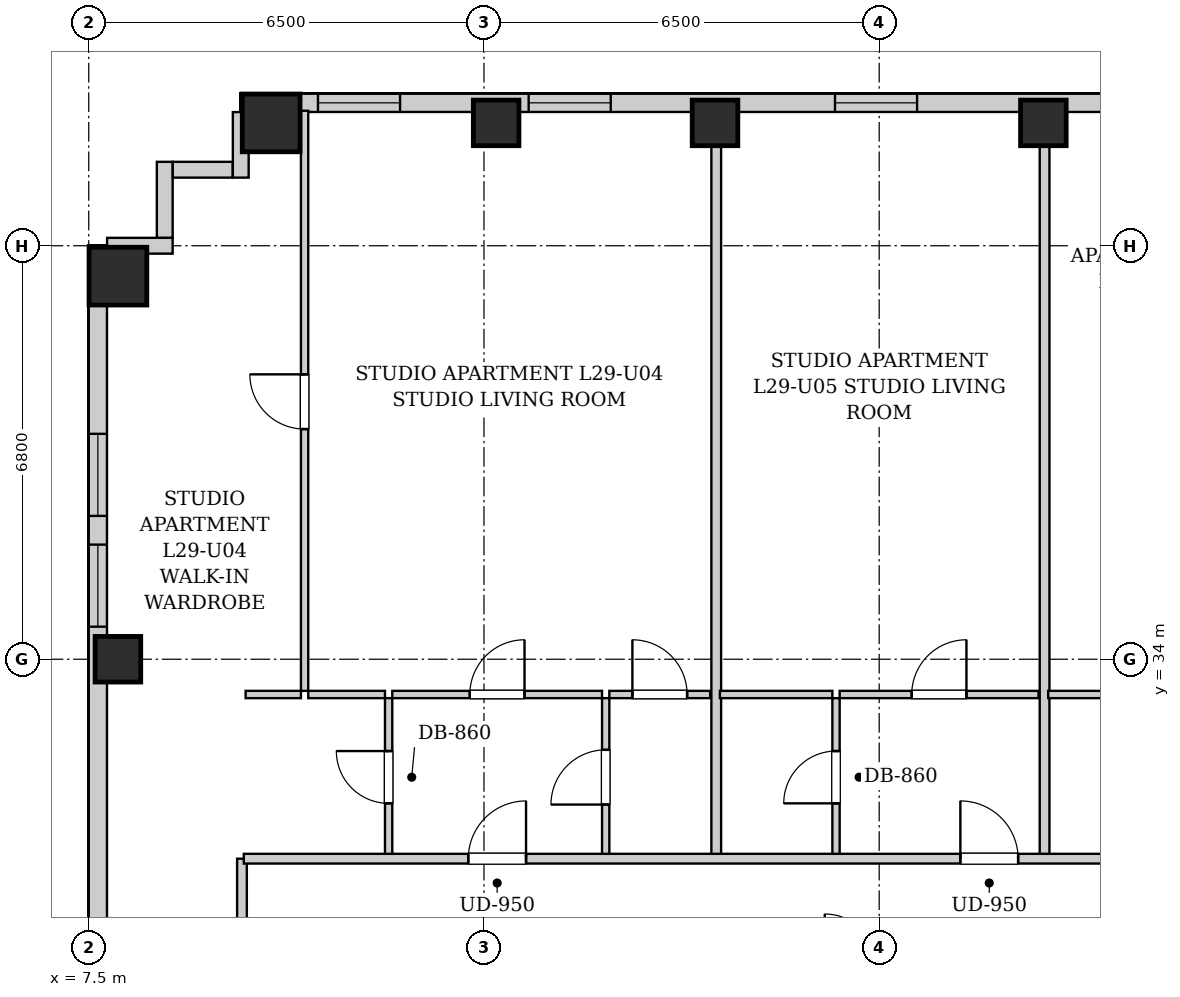
"""IFC4 building model, lengths in metres.
Left out: names, types, materials, properties, quantities, classifications, styles, units other than length and angle.
Written with IfcOpenShell. Run it as: python <this file> out.ifc"""

import sys

from ifc_helpers import new_model, si_unit, direction, frame, frame_2d, origin, origin_2d, place, context, subcontext, project, spatial, rectangle, extrude, element, fill, save


model = new_model("IFC4")
c1 = context("Model", 3, precision=1e-05, world=origin(), true_north=direction((0.0, 1.0)))
c2 = subcontext(c1, "Body", "Model", "MODEL_VIEW")
j1 = project(units=[si_unit("LENGTHUNIT", "METRE"), si_unit("PLANEANGLEUNIT", "RADIAN")], contexts=[c1])
p1 = place(None, origin())
s1 = spatial("IfcSite", under=j1, at=p1, CompositionType="ELEMENT")
p2 = place(p1, origin())
s2 = spatial("IfcBuilding", under=s1, at=p2, CompositionType="ELEMENT")
p3 = place(p2, frame((0.0, 0.0, 103.9)))
s3 = spatial("IfcBuildingStorey", under=s2, at=p3, CompositionType="ELEMENT", Elevation=103.9)
p4 = place(p3, frame((10.5, 42.82, 0.0), z_axis=(0.0, 0.0, 1.0), x_axis=(1.0, 0.0, 0.0)))
e1 = element("IfcColumn", 1, at=p4, inside=s3, PredefinedType="COLUMN", context=c2, shape_type="SweptSolid", body=[
    extrude(rectangle(XDim=0.95, YDim=0.95, at=origin_2d()), origin(), (0.0, 0.0, 1.0), 3.2),
])
for number, where, z_axis, x_axis in (
    (2, (14.2, 42.82, 0.0), (0.0, 0.0, 1.0), (1.0, 0.0, 0.0)),
    (3, (17.8, 42.82, 0.0), (0.0, 0.0, 1.0), (1.0, 0.0, 0.0)),
    (4, (23.2, 42.82, 0.0), (0.0, 0.0, 1.0), (1.0, 0.0, 0.0)),
    (5, (7.98, 34.0, 0.0), (0.0, 0.0, 1.0), (1.0, 0.0, 0.0)),
):
    element("IfcColumn", number, at=place(p3, frame(where, z_axis=z_axis, x_axis=x_axis)), inside=s3, PredefinedType="COLUMN", context=c2, shape_type="SweptSolid", body=[
        extrude(rectangle(XDim=0.75, YDim=0.75, at=origin_2d()), origin(), (0.0, 0.0, 1.0), 3.2),
    ])
p5 = place(p3, frame((7.98, 40.3, 0.0), z_axis=(0.0, 0.0, 1.0), x_axis=(1.0, 0.0, 0.0)))
e6 = element("IfcColumn", 6, at=p5, inside=s3, PredefinedType="COLUMN", context=c2, shape_type="SweptSolid", body=[
    extrude(rectangle(XDim=0.95, YDim=0.95, at=origin_2d()), origin(), (0.0, 0.0, 1.0), 3.2),
])
p6 = place(p3, frame((10.0, 43.15, 0.0), z_axis=(0.0, 0.0, 1.0), x_axis=(1.0, 0.0, 0.0)))
e7 = element("IfcWall", 7, at=p6, inside=s3, PredefinedType="SOLIDWALL", context=c2, shape_type="SweptSolid", body=[
    extrude(rectangle(XDim=23.15, YDim=0.3, at=frame_2d((11.575, 0.0))), origin(), (0.0, 0.0, 1.0), 2.94),
])
p7 = place(p6, frame((4.735, 0.0, 0.55)))
e8 = element("IfcOpeningElement", 8, at=p7, cuts=e7, PredefinedType="OPENING", context=c2, shape_type="SweptSolid", body=[
    extrude(rectangle(XDim=1.35, YDim=1.2, at=frame_2d((0.675, 0.6))), frame((0.0, 0.16, 0.0), z_axis=(0.0, -1.0, 0.0), x_axis=(1.0, 0.0, 0.0)), (0.0, 0.0, 1.0), 0.32),
])
p8 = place(p6, frame((1.27, 0.0, 0.55)))
e9 = element("IfcOpeningElement", 9, at=p8, cuts=e7, PredefinedType="OPENING", context=c2, shape_type="SweptSolid", body=[
    extrude(rectangle(XDim=1.35, YDim=1.2, at=frame_2d((0.675, 0.6))), frame((0.0, 0.16, 0.0), z_axis=(0.0, -1.0, 0.0), x_axis=(1.0, 0.0, 0.0)), (0.0, 0.0, 1.0), 0.32),
])
p9 = place(p6, frame((9.773, 0.0, 0.55)))
e10 = element("IfcOpeningElement", 10, at=p9, cuts=e7, PredefinedType="OPENING", context=c2, shape_type="SweptSolid", body=[
    extrude(rectangle(XDim=1.35, YDim=1.2, at=frame_2d((0.675, 0.6))), frame((0.0, 0.16, 0.0), z_axis=(0.0, -1.0, 0.0), x_axis=(1.0, 0.0, 0.0)), (0.0, 0.0, 1.0), 0.32),
])
p10 = place(p6, frame((17.5, 0.0, 0.55)))
e11 = element("IfcOpeningElement", 11, at=p10, cuts=e7, PredefinedType="OPENING", context=c2, shape_type="SweptSolid", body=[
    extrude(rectangle(XDim=0.85, YDim=1.2, at=frame_2d((0.425, 0.6))), frame((0.0, 0.16, 0.0), z_axis=(0.0, -1.0, 0.0), x_axis=(1.0, 0.0, 0.0)), (0.0, 0.0, 1.0), 0.32),
])
p11 = place(p6, frame((19.393, 0.0, 0.55)))
e12 = element("IfcOpeningElement", 12, at=p11, cuts=e7, PredefinedType="OPENING", context=c2, shape_type="SweptSolid", body=[
    extrude(rectangle(XDim=1.35, YDim=1.2, at=frame_2d((0.675, 0.6))), frame((0.0, 0.16, 0.0), z_axis=(0.0, -1.0, 0.0), x_axis=(1.0, 0.0, 0.0)), (0.0, 0.0, 1.0), 0.32),
])
p12 = place(p3, frame((7.65, 19.4, 0.0), z_axis=(0.0, 0.0, 1.0), x_axis=(0.0, 1.0, 0.0)))
e13 = element("IfcWall", 13, at=p12, inside=s3, PredefinedType="SOLIDWALL", context=c2, shape_type="SweptSolid", body=[
    extrude(rectangle(XDim=21.4, YDim=0.3, at=frame_2d((10.7, 0.0))), origin(), (0.0, 0.0, 1.0), 2.94),
])
p13 = place(p12, frame((16.957, 0.0, 0.55)))
e14 = element("IfcOpeningElement", 14, at=p13, cuts=e13, PredefinedType="OPENING", context=c2, shape_type="SweptSolid", body=[
    extrude(rectangle(XDim=1.35, YDim=1.2, at=frame_2d((0.675, 0.6))), frame((0.0, 0.16, 0.0), z_axis=(0.0, -1.0, 0.0), x_axis=(1.0, 0.0, 0.0)), (0.0, 0.0, 1.0), 0.32),
])
p14 = place(p12, frame((15.135, 0.0, 0.55)))
e15 = element("IfcOpeningElement", 15, at=p14, cuts=e13, PredefinedType="OPENING", context=c2, shape_type="SweptSolid", body=[
    extrude(rectangle(XDim=1.35, YDim=1.2, at=frame_2d((0.675, 0.6))), frame((0.0, 0.16, 0.0), z_axis=(0.0, -1.0, 0.0), x_axis=(1.0, 0.0, 0.0)), (0.0, 0.0, 1.0), 0.32),
])
p15 = place(p3, frame((7.802, 40.8, 0.0), z_axis=(0.0, 0.0, 1.0), x_axis=(1.0, 0.0, 0.0)))
e16 = element("IfcWall", 16, at=p15, inside=s3, PredefinedType="SOLIDWALL", context=c2, shape_type="SweptSolid", body=[
    extrude(rectangle(XDim=1.078, YDim=0.26, at=frame_2d((0.539, 0.0))), origin(), (0.0, 0.0, 1.0), 2.94),
])
p16 = place(p3, frame((8.75, 40.932, 0.0), z_axis=(0.0, 0.0, 1.0), x_axis=(0.0, 1.0, 0.0)))
e17 = element("IfcWall", 17, at=p16, inside=s3, PredefinedType="SOLIDWALL", context=c2, shape_type="SweptSolid", body=[
    extrude(rectangle(XDim=1.248, YDim=0.26, at=frame_2d((0.624, 0.0))), origin(), (0.0, 0.0, 1.0), 2.94),
])
p17 = place(p3, frame((8.882, 42.05, 0.0), z_axis=(0.0, 0.0, 1.0), x_axis=(1.0, 0.0, 0.0)))
e18 = element("IfcWall", 18, at=p17, inside=s3, PredefinedType="SOLIDWALL", context=c2, shape_type="SweptSolid", body=[
    extrude(rectangle(XDim=0.986, YDim=0.26, at=frame_2d((0.493, 0.0))), origin(), (0.0, 0.0, 1.0), 2.94),
])
p18 = place(p3, frame((10.0, 41.92, 0.0), z_axis=(0.0, 0.0, 1.0), x_axis=(0.0, 1.0, 0.0)))
e19 = element("IfcWall", 19, at=p18, inside=s3, PredefinedType="SOLIDWALL", context=c2, shape_type="SweptSolid", body=[
    extrude(rectangle(XDim=1.078, YDim=0.26, at=frame_2d((0.539, 0.0))), origin(), (0.0, 0.0, 1.0), 2.94),
])
p19 = place(p3, frame((10.02, 28.98, 0.0), z_axis=(0.0, 0.0, 1.0), x_axis=(0.0, 1.0, 0.0)))
e20 = element("IfcWall", 20, at=p19, inside=s3, PredefinedType="PARTITIONING", context=c2, shape_type="SweptSolid", body=[
    extrude(rectangle(XDim=1.74, YDim=0.16, at=frame_2d((0.87, 0.0))), origin(), (0.0, 0.0, 1.0), 2.94),
])
p20 = place(p3, frame((12.432, 30.76, 0.0), z_axis=(0.0, 0.0, 1.0), x_axis=(0.0, 1.0, 0.0)))
e21 = element("IfcWall", 21, at=p20, inside=s3, PredefinedType="PARTITIONING", context=c2, shape_type="SweptSolid", body=[
    extrude(rectangle(XDim=2.6, YDim=0.12, at=frame_2d((1.3, 0.0))), origin(), (0.0, 0.0, 1.0), 2.94),
])
p21 = place(p20, frame((0.87, 0.0, 0.0)))
e22 = element("IfcOpeningElement", 22, at=p21, cuts=e21, PredefinedType="OPENING", context=c2, shape_type="SweptSolid", body=[
    extrude(rectangle(XDim=0.86, YDim=2.05, at=frame_2d((0.43, 1.025))), frame((0.0, 0.07, 0.0), z_axis=(0.0, -1.0, 0.0), x_axis=(1.0, 0.0, 0.0)), (0.0, 0.0, 1.0), 0.14),
])
p22 = place(p3, frame((10.08, 33.42, 0.0), z_axis=(0.0, 0.0, 1.0), x_axis=(1.0, 0.0, 0.0)))
e23 = element("IfcWall", 23, at=p22, inside=s3, PredefinedType="PARTITIONING", context=c2, shape_type="SweptSolid", body=[
    extrude(rectangle(XDim=0.91, YDim=0.12, at=frame_2d((0.455, 0.0))), origin(), (0.0, 0.0, 1.0), 2.94),
])
p23 = place(p3, frame((11.11, 33.42, 0.0), z_axis=(0.0, 0.0, 1.0), x_axis=(1.0, 0.0, 0.0)))
e24 = element("IfcWall", 24, at=p23, inside=s3, PredefinedType="PARTITIONING", context=c2, shape_type="SweptSolid", body=[
    extrude(rectangle(XDim=1.262, YDim=0.12, at=frame_2d((0.631, 0.0))), origin(), (0.0, 0.0, 1.0), 2.94),
])
p24 = place(p3, frame((16.002, 30.76, 0.0), z_axis=(0.0, 0.0, 1.0), x_axis=(0.0, 1.0, 0.0)))
e25 = element("IfcWall", 25, at=p24, inside=s3, PredefinedType="PARTITIONING", context=c2, shape_type="SweptSolid", body=[
    extrude(rectangle(XDim=2.6, YDim=0.12, at=frame_2d((1.3, 0.0))), origin(), (0.0, 0.0, 1.0), 2.94),
])
p25 = place(p24, frame((0.85, 0.0, 0.0)))
e26 = element("IfcOpeningElement", 26, at=p25, cuts=e25, PredefinedType="OPENING", context=c2, shape_type="SweptSolid", body=[
    extrude(rectangle(XDim=0.9, YDim=2.05, at=frame_2d((0.45, 1.025))), frame((0.0, 0.07, 0.0), z_axis=(0.0, -1.0, 0.0), x_axis=(1.0, 0.0, 0.0)), (0.0, 0.0, 1.0), 0.14),
])
p26 = place(p3, frame((12.492, 33.42, 0.0), z_axis=(0.0, 0.0, 1.0), x_axis=(1.0, 0.0, 0.0)))
e27 = element("IfcWall", 27, at=p26, inside=s3, PredefinedType="PARTITIONING", context=c2, shape_type="SweptSolid", body=[
    extrude(rectangle(XDim=3.45, YDim=0.12, at=frame_2d((1.725, 0.0))), origin(), (0.0, 0.0, 1.0), 2.94),
])
p27 = place(p26, frame((1.275, 0.0, 0.0)))
e28 = element("IfcOpeningElement", 28, at=p27, cuts=e27, PredefinedType="OPENING", context=c2, shape_type="SweptSolid", body=[
    extrude(rectangle(XDim=0.9, YDim=2.05, at=frame_2d((0.45, 1.025))), frame((0.0, 0.07, 0.0), z_axis=(0.0, -1.0, 0.0), x_axis=(1.0, 0.0, 0.0)), (0.0, 0.0, 1.0), 0.14),
])
p28 = place(p3, frame((16.062, 33.42, 0.0), z_axis=(0.0, 0.0, 1.0), x_axis=(1.0, 0.0, 0.0)))
e29 = element("IfcWall", 29, at=p28, inside=s3, PredefinedType="PARTITIONING", context=c2, shape_type="SweptSolid", body=[
    extrude(rectangle(XDim=1.658, YDim=0.12, at=frame_2d((0.829, 0.0))), origin(), (0.0, 0.0, 1.0), 2.94),
])
p29 = place(p28, frame((0.379, 0.0, 0.0)))
e30 = element("IfcOpeningElement", 30, at=p29, cuts=e29, PredefinedType="OPENING", context=c2, shape_type="SweptSolid", body=[
    extrude(rectangle(XDim=0.9, YDim=2.05, at=frame_2d((0.45, 1.025))), frame((0.0, 0.07, 0.0), z_axis=(0.0, -1.0, 0.0), x_axis=(1.0, 0.0, 0.0)), (0.0, 0.0, 1.0), 0.14),
])
p30 = place(p3, frame((11.05, 33.48, 0.0), z_axis=(0.0, 0.0, 1.0), x_axis=(0.0, 1.0, 0.0)))
e31 = element("IfcWall", 31, at=p30, inside=s3, PredefinedType="PARTITIONING", context=c2, shape_type="SweptSolid", body=[
    extrude(rectangle(XDim=9.54, YDim=0.12, at=frame_2d((4.77, 0.0))), origin(), (0.0, 0.0, 1.0), 2.94),
])
p31 = place(p30, frame((4.305, 0.0, 0.0)))
e32 = element("IfcOpeningElement", 32, at=p31, cuts=e31, PredefinedType="OPENING", context=c2, shape_type="SweptSolid", body=[
    extrude(rectangle(XDim=0.9, YDim=2.05, at=frame_2d((0.45, 1.025))), frame((0.0, 0.07, 0.0), z_axis=(0.0, -1.0, 0.0), x_axis=(1.0, 0.0, 0.0)), (0.0, 0.0, 1.0), 0.14),
])
p32 = place(p3, frame((17.82, 30.76, 0.0), z_axis=(0.0, 0.0, 1.0), x_axis=(0.0, 1.0, 0.0)))
e33 = element("IfcWall", 33, at=p32, inside=s3, PredefinedType="PARTITIONING", context=c2, shape_type="SweptSolid", body=[
    extrude(rectangle(XDim=12.26, YDim=0.16, at=frame_2d((6.13, 0.0))), origin(), (0.0, 0.0, 1.0), 2.313),
])
p33 = place(p3, frame((19.79, 30.76, 0.0), z_axis=(0.0, 0.0, 1.0), x_axis=(0.0, 1.0, 0.0)))
e34 = element("IfcWall", 34, at=p33, inside=s3, PredefinedType="PARTITIONING", context=c2, shape_type="SweptSolid", body=[
    extrude(rectangle(XDim=2.6, YDim=0.12, at=frame_2d((1.3, 0.0))), origin(), (0.0, 0.0, 1.0), 2.94),
])
p34 = place(p33, frame((0.87, 0.0, 0.0)))
e35 = element("IfcOpeningElement", 35, at=p34, cuts=e34, PredefinedType="OPENING", context=c2, shape_type="SweptSolid", body=[
    extrude(rectangle(XDim=0.86, YDim=2.05, at=frame_2d((0.43, 1.025))), frame((0.0, 0.07, 0.0), z_axis=(0.0, -1.0, 0.0), x_axis=(1.0, 0.0, 0.0)), (0.0, 0.0, 1.0), 0.14),
])
p35 = place(p3, frame((17.88, 33.42, 0.0), z_axis=(0.0, 0.0, 1.0), x_axis=(1.0, 0.0, 0.0)))
e36 = element("IfcWall", 36, at=p35, inside=s3, PredefinedType="PARTITIONING", context=c2, shape_type="SweptSolid", body=[
    extrude(rectangle(XDim=1.85, YDim=0.12, at=frame_2d((0.925, 0.0))), origin(), (0.0, 0.0, 1.0), 2.94),
])
p36 = place(p3, frame((19.85, 33.42, 0.0), z_axis=(0.0, 0.0, 1.0), x_axis=(1.0, 0.0, 0.0)))
e37 = element("IfcWall", 37, at=p36, inside=s3, PredefinedType="PARTITIONING", context=c2, shape_type="SweptSolid", body=[
    extrude(rectangle(XDim=3.27, YDim=0.12, at=frame_2d((1.635, 0.0))), origin(), (0.0, 0.0, 1.0), 2.94),
])
p37 = place(p36, frame((1.185, 0.0, 0.0)))
e38 = element("IfcOpeningElement", 38, at=p37, cuts=e37, PredefinedType="OPENING", context=c2, shape_type="SweptSolid", body=[
    extrude(rectangle(XDim=0.9, YDim=2.05, at=frame_2d((0.45, 1.025))), frame((0.0, 0.07, 0.0), z_axis=(0.0, -1.0, 0.0), x_axis=(1.0, 0.0, 0.0)), (0.0, 0.0, 1.0), 0.14),
])
p38 = place(p3, frame((23.22, 30.76, 0.0), z_axis=(0.0, 0.0, 1.0), x_axis=(0.0, 1.0, 0.0)))
e39 = element("IfcWall", 39, at=p38, inside=s3, PredefinedType="PARTITIONING", context=c2, shape_type="SweptSolid", body=[
    extrude(rectangle(XDim=12.26, YDim=0.16, at=frame_2d((6.13, 0.0))), origin(), (0.0, 0.0, 1.0), 2.94),
])
p39 = place(p3, frame((23.28, 33.42, 0.0), z_axis=(0.0, 0.0, 1.0), x_axis=(1.0, 0.0, 0.0)))
e40 = element("IfcWall", 40, at=p39, inside=s3, PredefinedType="PARTITIONING", context=c2, shape_type="SweptSolid", body=[
    extrude(rectangle(XDim=2.4, YDim=0.12, at=frame_2d((1.2, 0.0))), origin(), (0.0, 0.0, 1.0), 2.94),
])
p40 = place(p3, frame((10.05, 30.72, 0.0), z_axis=(0.0, 0.0, 1.0), x_axis=(1.0, 0.0, 0.0)))
e41 = element("IfcWall", 41, at=p40, inside=s3, PredefinedType="PARTITIONING", context=c2, shape_type="SweptSolid", body=[
    extrude(rectangle(XDim=30.8, YDim=0.16, at=frame_2d((15.4, 0.0))), origin(), (0.0, 0.0, 1.0), 2.94),
])
p41 = place(p40, frame((3.692, 0.0, 0.0)))
e42 = element("IfcOpeningElement", 42, at=p41, cuts=e41, PredefinedType="OPENING", context=c2, shape_type="SweptSolid", body=[
    extrude(rectangle(XDim=0.95, YDim=2.1, at=frame_2d((0.475, 1.05))), frame((0.0, 0.09, 0.0), z_axis=(0.0, -1.0, 0.0), x_axis=(1.0, 0.0, 0.0)), (0.0, 0.0, 1.0), 0.18),
])
p42 = place(p40, frame((11.785, 0.0, 0.0)))
e43 = element("IfcOpeningElement", 43, at=p42, cuts=e41, PredefinedType="OPENING", context=c2, shape_type="SweptSolid", body=[
    extrude(rectangle(XDim=0.95, YDim=2.1, at=frame_2d((0.475, 1.05))), frame((0.0, 0.09, 0.0), z_axis=(0.0, -1.0, 0.0), x_axis=(1.0, 0.0, 0.0)), (0.0, 0.0, 1.0), 0.18),
])
p43 = place(p40, frame((17.235, 0.0, 0.0)))
e44 = element("IfcOpeningElement", 44, at=p43, cuts=e41, PredefinedType="OPENING", context=c2, shape_type="SweptSolid", body=[
    extrude(rectangle(XDim=0.95, YDim=2.1, at=frame_2d((0.475, 1.05))), frame((0.0, 0.09, 0.0), z_axis=(0.0, -1.0, 0.0), x_axis=(1.0, 0.0, 0.0)), (0.0, 0.0, 1.0), 0.18),
])
p44 = place(p40, frame((28.64, 0.0, 0.0)))
e45 = element("IfcOpeningElement", 45, at=p44, cuts=e41, PredefinedType="OPENING", context=c2, shape_type="SweptSolid", body=[
    extrude(rectangle(XDim=0.95, YDim=2.1, at=frame_2d((0.475, 1.05))), frame((0.0, 0.09, 0.0), z_axis=(0.0, -1.0, 0.0), x_axis=(1.0, 0.0, 0.0)), (0.0, 0.0, 1.0), 0.18),
])
p45 = place(p21, origin())
e46 = element("IfcDoor", 46, at=p45, inside=s3, OperationType="SINGLE_SWING_RIGHT", PredefinedType="DOOR", context=c2, shape_type="SweptSolid", body=[
    extrude(rectangle(XDim=0.86, YDim=2.05, at=frame_2d((0.43, 1.025))), frame((0.0, 0.025, 0.0), z_axis=(0.0, -1.0, 0.0), x_axis=(1.0, 0.0, 0.0)), (0.0, 0.0, 1.0), 0.05),
])
fill(e22, e46)
p46 = place(p25, origin())
e47 = element("IfcDoor", 47, at=p46, inside=s3, OperationType="SINGLE_SWING_LEFT", PredefinedType="DOOR", context=c2, shape_type="SweptSolid", body=[
    extrude(rectangle(XDim=0.9, YDim=2.05, at=frame_2d((0.45, 1.025))), frame((0.0, 0.025, 0.0), z_axis=(0.0, -1.0, 0.0), x_axis=(1.0, 0.0, 0.0)), (0.0, 0.0, 1.0), 0.05),
])
fill(e26, e47)
p47 = place(p27, origin())
e48 = element("IfcDoor", 48, at=p47, inside=s3, OperationType="SINGLE_SWING_RIGHT", PredefinedType="DOOR", context=c2, shape_type="SweptSolid", body=[
    extrude(rectangle(XDim=0.9, YDim=2.05, at=frame_2d((0.45, 1.025))), frame((0.0, 0.025, 0.0), z_axis=(0.0, -1.0, 0.0), x_axis=(1.0, 0.0, 0.0)), (0.0, 0.0, 1.0), 0.05),
])
fill(e28, e48)
p48 = place(p29, origin())
e49 = element("IfcDoor", 49, at=p48, inside=s3, OperationType="SINGLE_SWING_LEFT", PredefinedType="DOOR", context=c2, shape_type="SweptSolid", body=[
    extrude(rectangle(XDim=0.9, YDim=2.05, at=frame_2d((0.45, 1.025))), frame((0.0, 0.025, 0.0), z_axis=(0.0, -1.0, 0.0), x_axis=(1.0, 0.0, 0.0)), (0.0, 0.0, 1.0), 0.05),
])
fill(e30, e49)
p49 = place(p31, origin())
e50 = element("IfcDoor", 50, at=p49, inside=s3, OperationType="SINGLE_SWING_RIGHT", PredefinedType="DOOR", context=c2, shape_type="SweptSolid", body=[
    extrude(rectangle(XDim=0.9, YDim=2.05, at=frame_2d((0.45, 1.025))), frame((0.0, 0.025, 0.0), z_axis=(0.0, -1.0, 0.0), x_axis=(1.0, 0.0, 0.0)), (0.0, 0.0, 1.0), 0.05),
])
fill(e32, e50)
p50 = place(p34, origin())
e51 = element("IfcDoor", 51, at=p50, inside=s3, OperationType="SINGLE_SWING_LEFT", PredefinedType="DOOR", context=c2, shape_type="SweptSolid", body=[
    extrude(rectangle(XDim=0.86, YDim=2.05, at=frame_2d((0.43, 1.025))), frame((0.0, 0.025, 0.0), z_axis=(0.0, -1.0, 0.0), x_axis=(1.0, 0.0, 0.0)), (0.0, 0.0, 1.0), 0.05),
])
fill(e35, e51)
p51 = place(p37, origin())
e52 = element("IfcDoor", 52, at=p51, inside=s3, OperationType="SINGLE_SWING_RIGHT", PredefinedType="DOOR", context=c2, shape_type="SweptSolid", body=[
    extrude(rectangle(XDim=0.9, YDim=2.05, at=frame_2d((0.45, 1.025))), frame((0.0, 0.025, 0.0), z_axis=(0.0, -1.0, 0.0), x_axis=(1.0, 0.0, 0.0)), (0.0, 0.0, 1.0), 0.05),
])
fill(e38, e52)
p52 = place(p41, origin())
e53 = element("IfcDoor", 53, at=p52, inside=s3, OperationType="SINGLE_SWING_RIGHT", PredefinedType="DOOR", context=c2, shape_type="SweptSolid", body=[
    extrude(rectangle(XDim=0.95, YDim=2.1, at=frame_2d((0.475, 1.05))), frame((0.0, 0.025, 0.0), z_axis=(0.0, -1.0, 0.0), x_axis=(1.0, 0.0, 0.0)), (0.0, 0.0, 1.0), 0.05),
])
fill(e42, e53)
p53 = place(p42, origin())
e54 = element("IfcDoor", 54, at=p53, inside=s3, OperationType="SINGLE_SWING_LEFT", PredefinedType="DOOR", context=c2, shape_type="SweptSolid", body=[
    extrude(rectangle(XDim=0.95, YDim=2.1, at=frame_2d((0.475, 1.05))), frame((0.0, 0.025, 0.0), z_axis=(0.0, -1.0, 0.0), x_axis=(1.0, 0.0, 0.0)), (0.0, 0.0, 1.0), 0.05),
])
fill(e43, e54)
p54 = place(p13, origin())
e55 = element("IfcWindow", 55, at=p54, inside=s3, PartitioningType="SINGLE_PANEL", PredefinedType="WINDOW", context=c2, shape_type="SweptSolid", body=[
    extrude(rectangle(XDim=1.35, YDim=1.2, at=frame_2d((0.675, 0.6))), frame((0.0, 0.03, 0.0), z_axis=(0.0, -1.0, 0.0), x_axis=(1.0, 0.0, 0.0)), (0.0, 0.0, 1.0), 0.06),
])
fill(e14, e55)
p55 = place(p14, origin())
e56 = element("IfcWindow", 56, at=p55, inside=s3, PartitioningType="SINGLE_PANEL", PredefinedType="WINDOW", context=c2, shape_type="SweptSolid", body=[
    extrude(rectangle(XDim=1.35, YDim=1.2, at=frame_2d((0.675, 0.6))), frame((0.0, 0.03, 0.0), z_axis=(0.0, -1.0, 0.0), x_axis=(1.0, 0.0, 0.0)), (0.0, 0.0, 1.0), 0.06),
])
fill(e15, e56)
p56 = place(p7, origin())
e57 = element("IfcWindow", 57, at=p56, inside=s3, PartitioningType="SINGLE_PANEL", PredefinedType="WINDOW", context=c2, shape_type="SweptSolid", body=[
    extrude(rectangle(XDim=1.35, YDim=1.2, at=frame_2d((0.675, 0.6))), frame((0.0, 0.03, 0.0), z_axis=(0.0, -1.0, 0.0), x_axis=(1.0, 0.0, 0.0)), (0.0, 0.0, 1.0), 0.06),
])
fill(e8, e57)
p57 = place(p8, origin())
e58 = element("IfcWindow", 58, at=p57, inside=s3, PartitioningType="SINGLE_PANEL", PredefinedType="WINDOW", context=c2, shape_type="SweptSolid", body=[
    extrude(rectangle(XDim=1.35, YDim=1.2, at=frame_2d((0.675, 0.6))), frame((0.0, 0.03, 0.0), z_axis=(0.0, -1.0, 0.0), x_axis=(1.0, 0.0, 0.0)), (0.0, 0.0, 1.0), 0.06),
])
fill(e9, e58)
p58 = place(p9, origin())
e59 = element("IfcWindow", 59, at=p58, inside=s3, PartitioningType="SINGLE_PANEL", PredefinedType="WINDOW", context=c2, shape_type="SweptSolid", body=[
    extrude(rectangle(XDim=1.35, YDim=1.2, at=frame_2d((0.675, 0.6))), frame((0.0, 0.03, 0.0), z_axis=(0.0, -1.0, 0.0), x_axis=(1.0, 0.0, 0.0)), (0.0, 0.0, 1.0), 0.06),
])
fill(e10, e59)
save(model, sys.argv[1])
